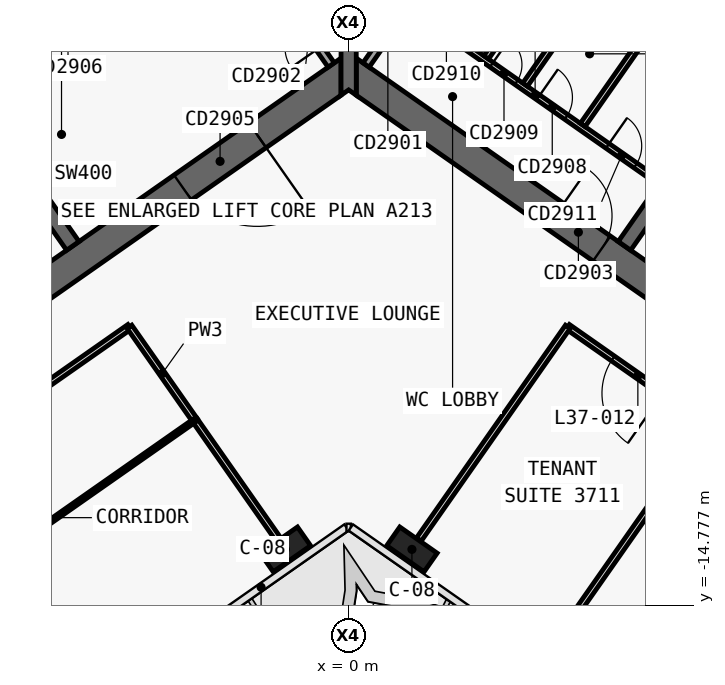
"""IFC4 building model, lengths in metres.
Left out: names, types, materials, properties, quantities, classifications, styles, units other than length and angle.
Written with IfcOpenShell. Run it as: python <this file> out.ifc"""

import sys

from ifc_helpers import new_model, si_unit, direction, frame, frame_2d, origin, origin_2d, place, context, subcontext, project, spatial, polyline, rectangle, outline, extrude, element, fill, save


model = new_model("IFC4")
c1 = context("Model", 3, precision=1e-05, world=origin(), true_north=direction((0.0, 1.0)))
c2 = subcontext(c1, "Body", "Model", "MODEL_VIEW")
j1 = project(units=[si_unit("LENGTHUNIT", "METRE"), si_unit("PLANEANGLEUNIT", "RADIAN")], contexts=[c1])
p1 = place(None, origin())
s1 = spatial("IfcSite", under=j1, at=p1, CompositionType="ELEMENT")
p2 = place(p1, origin())
s2 = spatial("IfcBuilding", under=s1, at=p2, CompositionType="ELEMENT")
p3 = place(p2, frame((0.0, 0.0, 163.2)))
s3 = spatial("IfcBuildingStorey", under=s2, at=p3, CompositionType="ELEMENT", Elevation=163.2)
p4 = place(p3, frame((0.029, 11.984, 0.0), z_axis=(0.0, 0.0, 1.0), x_axis=(-0.819151382952, -0.573577380837, 0.0)))
e1 = element("IfcWall", 1, at=p4, inside=s3, PredefinedType="SHEAR", context=c2, shape_type="SweptSolid", body=[
    extrude(outline(polyline([(33.898, 0.4), (0.56, 0.4), (-0.0, -0.4), (33.898, -0.4), (33.898, 0.4)])), origin(), (0.0, 0.0, 1.0), 3.9),
])
p5 = place(p3, frame((0.029, -0.712, 0.0), z_axis=(0.0, 0.0, 1.0), x_axis=(-0.819151758019, -0.573576845187, 0.0)))
e2 = element("IfcWall", 2, at=p5, inside=s3, PredefinedType="SHEAR", context=c2, shape_type="SweptSolid", body=[
    extrude(outline(polyline([(26.616, 0.4), (0.56, 0.4), (-0.0, -0.4), (26.616, -0.4), (26.616, 0.4)])), origin(), (0.0, 0.0, 1.0), 3.9),
])
p6 = place(p5, frame((2.966, 0.0, 0.0)))
e3 = element("IfcOpeningElement", 3, at=p6, cuts=e2, PredefinedType="OPENING", context=c2, shape_type="SweptSolid", body=[
    extrude(rectangle(XDim=2.4, YDim=2.1, at=frame_2d((1.2, 1.05))), frame((0.0, 0.41, 0.0), z_axis=(0.0, -1.0, 0.0), x_axis=(1.0, 0.0, 0.0)), (0.0, 0.0, 1.0), 0.82),
])
p7 = place(p5, frame((11.916, 0.0, 0.0)))
e4 = element("IfcOpeningElement", 4, at=p7, cuts=e2, PredefinedType="OPENING", context=c2, shape_type="SweptSolid", body=[
    extrude(rectangle(XDim=2.4, YDim=2.1, at=frame_2d((1.2, 1.05))), frame((0.0, 0.41, 0.0), z_axis=(0.0, -1.0, 0.0), x_axis=(1.0, 0.0, 0.0)), (0.0, 0.0, 1.0), 0.82),
])
p8 = place(p3, frame((-7.258, -5.326, 0.0), z_axis=(0.0, 0.0, 1.0), x_axis=(-0.573540709186, 0.819177059558, 0.0)))
e5 = element("IfcWall", 5, at=p8, inside=s3, PredefinedType="SHEAR", context=c2, shape_type="SweptSolid", body=[
    extrude(outline(polyline([(4.6, 0.2), (-0.0, 0.2), (-0.0, -0.2), (4.6, -0.2), (4.6, 0.2)])), origin(), (0.0, 0.0, 1.0), 3.9),
])
p9 = place(p3, frame((-2.638, 3.768, 0.0), z_axis=(0.0, 0.0, 1.0), x_axis=(-0.81915267502, -0.573575535572, 0.0)))
e6 = element("IfcWall", 6, at=p9, inside=s3, PredefinedType="SHEAR", context=c2, shape_type="SweptSolid", body=[
    extrude(outline(polyline([(26.2, 0.2), (0.0, 0.2), (0.0, -0.2), (26.2, -0.2), (26.2, 0.2)])), origin(), (0.0, 0.0, 1.0), 3.9),
])
p10 = place(p9, frame((1.169, 0.0, 0.0)))
e7 = element("IfcOpeningElement", 7, at=p10, cuts=e6, PredefinedType="OPENING", context=c2, shape_type="SweptSolid", body=[
    extrude(rectangle(XDim=1.1, YDim=2.1, at=frame_2d((0.55, 1.05))), frame((0.0, 0.21, 0.0), z_axis=(0.0, -1.0, 0.0), x_axis=(1.0, 0.0, 0.0)), (0.0, 0.0, 1.0), 0.42),
])
p11 = place(p9, frame((3.206, 0.0, 0.0)))
e8 = element("IfcOpeningElement", 8, at=p11, cuts=e6, PredefinedType="OPENING", context=c2, shape_type="SweptSolid", body=[
    extrude(rectangle(XDim=1.1, YDim=2.1, at=frame_2d((0.55, 1.05))), frame((0.0, 0.21, 0.0), z_axis=(0.0, -1.0, 0.0), x_axis=(1.0, 0.0, 0.0)), (0.0, 0.0, 1.0), 0.42),
])
p12 = place(p9, frame((5.244, 0.0, 0.0)))
e9 = element("IfcOpeningElement", 9, at=p12, cuts=e6, PredefinedType="OPENING", context=c2, shape_type="SweptSolid", body=[
    extrude(rectangle(XDim=1.1, YDim=2.1, at=frame_2d((0.55, 1.05))), frame((0.0, 0.21, 0.0), z_axis=(0.0, -1.0, 0.0), x_axis=(1.0, 0.0, 0.0)), (0.0, 0.0, 1.0), 0.42),
])
p13 = place(p9, frame((7.281, 0.0, 0.0)))
e10 = element("IfcOpeningElement", 10, at=p13, cuts=e6, PredefinedType="OPENING", context=c2, shape_type="SweptSolid", body=[
    extrude(rectangle(XDim=1.1, YDim=2.1, at=frame_2d((0.55, 1.05))), frame((0.0, 0.21, 0.0), z_axis=(0.0, -1.0, 0.0), x_axis=(1.0, 0.0, 0.0)), (0.0, 0.0, 1.0), 0.42),
])
p14 = place(p9, frame((9.688, 0.0, 0.0)))
e11 = element("IfcOpeningElement", 11, at=p14, cuts=e6, PredefinedType="OPENING", context=c2, shape_type="SweptSolid", body=[
    extrude(rectangle(XDim=1.1, YDim=2.1, at=frame_2d((0.55, 1.05))), frame((0.0, 0.21, 0.0), z_axis=(0.0, -1.0, 0.0), x_axis=(1.0, 0.0, 0.0)), (0.0, 0.0, 1.0), 0.42),
])
p15 = place(p9, frame((11.863, 0.0, 0.0)))
e12 = element("IfcOpeningElement", 12, at=p15, cuts=e6, PredefinedType="OPENING", context=c2, shape_type="SweptSolid", body=[
    extrude(rectangle(XDim=1.1, YDim=2.1, at=frame_2d((0.55, 1.05))), frame((0.0, 0.21, 0.0), z_axis=(0.0, -1.0, 0.0), x_axis=(1.0, 0.0, 0.0)), (0.0, 0.0, 1.0), 0.42),
])
p16 = place(p9, frame((14.038, 0.0, 0.0)))
e13 = element("IfcOpeningElement", 13, at=p16, cuts=e6, PredefinedType="OPENING", context=c2, shape_type="SweptSolid", body=[
    extrude(rectangle(XDim=1.1, YDim=2.1, at=frame_2d((0.55, 1.05))), frame((0.0, 0.21, 0.0), z_axis=(0.0, -1.0, 0.0), x_axis=(1.0, 0.0, 0.0)), (0.0, 0.0, 1.0), 0.42),
])
p17 = place(p9, frame((16.212, 0.0, 0.0)))
e14 = element("IfcOpeningElement", 14, at=p17, cuts=e6, PredefinedType="OPENING", context=c2, shape_type="SweptSolid", body=[
    extrude(rectangle(XDim=1.1, YDim=2.1, at=frame_2d((0.55, 1.05))), frame((0.0, 0.21, 0.0), z_axis=(0.0, -1.0, 0.0), x_axis=(1.0, 0.0, 0.0)), (0.0, 0.0, 1.0), 0.42),
])
p18 = place(p3, frame((-0.029, 11.984, 0.0), z_axis=(0.0, 0.0, 1.0), x_axis=(0.819151382952, -0.573577380837, 0.0)))
e15 = element("IfcWall", 15, at=p18, inside=s3, PredefinedType="SHEAR", context=c2, shape_type="SweptSolid", body=[
    extrude(outline(polyline([(33.898, 0.4), (-0.0, 0.4), (0.56, -0.4), (33.898, -0.4), (33.898, 0.4)])), origin(), (0.0, 0.0, 1.0), 3.9),
])
p19 = place(p3, frame((-0.029, -0.712, 0.0), z_axis=(0.0, 0.0, 1.0), x_axis=(0.819151758019, -0.573576845187, 0.0)))
e16 = element("IfcWall", 16, at=p19, inside=s3, PredefinedType="SHEAR", context=c2, shape_type="SweptSolid", body=[
    extrude(outline(polyline([(26.616, 0.4), (-0.0, 0.4), (0.56, -0.4), (26.616, -0.4), (26.616, 0.4)])), origin(), (0.0, 0.0, 1.0), 3.9),
])
p20 = place(p19, frame((6.666, 0.0, 0.0)))
e17 = element("IfcOpeningElement", 17, at=p20, cuts=e16, PredefinedType="OPENING", context=c2, shape_type="SweptSolid", body=[
    extrude(rectangle(XDim=1.5, YDim=2.1, at=frame_2d((0.75, 1.05))), frame((0.0, 0.41, 0.0), z_axis=(0.0, -1.0, 0.0), x_axis=(1.0, 0.0, 0.0)), (0.0, 0.0, 1.0), 0.82),
])
p21 = place(p19, frame((12.366, 0.0, 0.0)))
e18 = element("IfcOpeningElement", 18, at=p21, cuts=e16, PredefinedType="OPENING", context=c2, shape_type="SweptSolid", body=[
    extrude(rectangle(XDim=1.5, YDim=2.1, at=frame_2d((0.75, 1.05))), frame((0.0, 0.41, 0.0), z_axis=(0.0, -1.0, 0.0), x_axis=(1.0, 0.0, 0.0)), (0.0, 0.0, 1.0), 0.82),
])
p22 = place(p3, frame((7.258, -5.326, 0.0), z_axis=(0.0, 0.0, 1.0), x_axis=(0.573540709186, 0.819177059558, 0.0)))
e19 = element("IfcWall", 19, at=p22, inside=s3, PredefinedType="SHEAR", context=c2, shape_type="SweptSolid", body=[
    extrude(outline(polyline([(-0.0, 0.2), (-0.0, -0.2), (4.6, -0.2), (4.6, 0.2), (-0.0, 0.2)])), origin(), (0.0, 0.0, 1.0), 3.9),
])
p23 = place(p3, frame((2.638, 3.768, 0.0), z_axis=(0.0, 0.0, 1.0), x_axis=(0.81915267502, -0.573575535572, 0.0)))
e20 = element("IfcWall", 20, at=p23, inside=s3, PredefinedType="SHEAR", context=c2, shape_type="SweptSolid", body=[
    extrude(outline(polyline([(0.0, 0.2), (0.0, -0.2), (26.2, -0.2), (26.2, 0.2), (0.0, 0.2)])), origin(), (0.0, 0.0, 1.0), 3.9),
])
p24 = place(p23, frame((9.637, 0.0, 0.0)))
e21 = element("IfcOpeningElement", 21, at=p24, cuts=e20, PredefinedType="OPENING", context=c2, shape_type="SweptSolid", body=[
    extrude(rectangle(XDim=1.2, YDim=2.1, at=frame_2d((0.6, 1.05))), frame((0.0, 0.21, 0.0), z_axis=(0.0, -1.0, 0.0), x_axis=(1.0, 0.0, 0.0)), (0.0, 0.0, 1.0), 0.42),
])
p25 = place(p23, frame((11.812, 0.0, 0.0)))
e22 = element("IfcOpeningElement", 22, at=p25, cuts=e20, PredefinedType="OPENING", context=c2, shape_type="SweptSolid", body=[
    extrude(rectangle(XDim=1.2, YDim=2.1, at=frame_2d((0.6, 1.05))), frame((0.0, 0.21, 0.0), z_axis=(0.0, -1.0, 0.0), x_axis=(1.0, 0.0, 0.0)), (0.0, 0.0, 1.0), 0.42),
])
p26 = place(p23, frame((13.988, 0.0, 0.0)))
e23 = element("IfcOpeningElement", 23, at=p26, cuts=e20, PredefinedType="OPENING", context=c2, shape_type="SweptSolid", body=[
    extrude(rectangle(XDim=1.2, YDim=2.1, at=frame_2d((0.6, 1.05))), frame((0.0, 0.21, 0.0), z_axis=(0.0, -1.0, 0.0), x_axis=(1.0, 0.0, 0.0)), (0.0, 0.0, 1.0), 0.42),
])
p27 = place(p23, frame((16.262, 0.0, 0.0)))
e24 = element("IfcOpeningElement", 24, at=p27, cuts=e20, PredefinedType="OPENING", context=c2, shape_type="SweptSolid", body=[
    extrude(rectangle(XDim=1.0, YDim=2.1, at=frame_2d((0.5, 1.05))), frame((0.0, 0.21, 0.0), z_axis=(0.0, -1.0, 0.0), x_axis=(1.0, 0.0, 0.0)), (0.0, 0.0, 1.0), 0.42),
])
p28 = place(p3, frame((0.0, -1.361, 0.0), z_axis=(0.0, 0.0, 1.0), x_axis=(0.0, 1.0, 0.0)))
e25 = element("IfcWall", 25, at=p28, inside=s3, PredefinedType="SHEAR", context=c2, shape_type="SweptSolid", body=[
    extrude(outline(polyline([(0.0, -0.2), (0.14, -0.2), (1.075, -0.2), (12.696, -0.2), (13.813, -0.2), (13.893, -0.2), (13.933, -0.172), (13.813, 0.0), (13.933, 0.172), (13.893, 0.2), (13.813, 0.2), (12.696, 0.2), (1.075, 0.2), (0.14, 0.2), (0.0, 0.2), (0.14, 0.0), (0.0, -0.2)])), origin(), (0.0, 0.0, 1.0), 3.9),
])
for number, where, z_axis, x_axis in (
    (26, (-1.665, -13.313, 0.0), (0.0, 0.0, 1.0), (-0.819, -0.574, 0.0)),
    (27, (1.665, -13.313, 0.0), (0.0, 0.0, 1.0), (0.819, -0.574, 0.0)),
):
    element("IfcColumn", number, at=place(p3, frame(where, z_axis=z_axis, x_axis=x_axis)), inside=s3, PredefinedType="COLUMN", context=c2, shape_type="SweptSolid", body=[
        extrude(rectangle(XDim=1.2, YDim=0.6, at=origin_2d()), origin(), (0.0, 0.0, 1.0), 3.9),
    ])
p29 = place(p3, frame((1.63, 0.934, 0.0), z_axis=(0.0, 0.0, 1.0), x_axis=(0.819165963305, -0.573556557423, 0.0)))
e28 = element("IfcWall", 28, at=p29, inside=s3, PredefinedType="PARTITIONING", context=c2, shape_type="SweptSolid", body=[
    extrude(rectangle(XDim=8.0, YDim=0.15, at=frame_2d((4.0, 0.0))), origin(), (0.0, 0.0, 1.0), 3.62),
])
p30 = place(p29, frame((0.7, 0.0, 0.0)))
e29 = element("IfcOpeningElement", 29, at=p30, cuts=e28, PredefinedType="OPENING", context=c2, shape_type="SweptSolid", body=[
    extrude(rectangle(XDim=0.9, YDim=2.1, at=frame_2d((0.45, 1.05))), frame((0.0, 0.085, 0.0), z_axis=(0.0, -1.0, 0.0), x_axis=(1.0, 0.0, 0.0)), (0.0, 0.0, 1.0), 0.17),
])
p31 = place(p29, frame((2.6, 0.0, 0.0)))
e30 = element("IfcOpeningElement", 30, at=p31, cuts=e28, PredefinedType="OPENING", context=c2, shape_type="SweptSolid", body=[
    extrude(rectangle(XDim=0.8, YDim=2.1, at=frame_2d((0.4, 1.05))), frame((0.0, 0.085, 0.0), z_axis=(0.0, -1.0, 0.0), x_axis=(1.0, 0.0, 0.0)), (0.0, 0.0, 1.0), 0.17),
])
p32 = place(p29, frame((4.1, 0.0, 0.0)))
e31 = element("IfcOpeningElement", 31, at=p32, cuts=e28, PredefinedType="OPENING", context=c2, shape_type="SweptSolid", body=[
    extrude(rectangle(XDim=0.9, YDim=2.1, at=frame_2d((0.45, 1.05))), frame((0.0, 0.085, 0.0), z_axis=(0.0, -1.0, 0.0), x_axis=(1.0, 0.0, 0.0)), (0.0, 0.0, 1.0), 0.17),
])
p33 = place(p29, frame((6.325, 0.0, 0.0)))
e32 = element("IfcOpeningElement", 32, at=p33, cuts=e28, PredefinedType="OPENING", context=c2, shape_type="SweptSolid", body=[
    extrude(rectangle(XDim=0.9, YDim=2.1, at=frame_2d((0.45, 1.05))), frame((0.0, 0.085, 0.0), z_axis=(0.0, -1.0, 0.0), x_axis=(1.0, 0.0, 0.0)), (0.0, 0.0, 1.0), 0.17),
])
for number, where, z_axis, x_axis in (
    (33, (3.619, -0.367, 0.0), (0.0, 0.0, 1.0), (0.574, 0.819, 0.0)),
    (34, (4.643, -1.084, 0.0), (0.0, 0.0, 1.0), (0.574, 0.819, 0.0)),
    (35, (6.158, -2.145, 0.0), (0.0, 0.0, 1.0), (0.574, 0.819, 0.0)),
):
    element("IfcWall", number, at=place(p3, frame(where, z_axis=z_axis, x_axis=x_axis)), inside=s3, PredefinedType="PARTITIONING", context=c2, shape_type="SweptSolid", body=[
        extrude(rectangle(XDim=2.625, YDim=0.15, at=frame_2d((1.312, 0.0))), origin(), (0.0, 0.0, 1.0), 3.62),
    ])
p34 = place(p3, frame((-0.459, -0.565, 0.0), z_axis=(0.0, 0.0, 1.0), x_axis=(-0.573576324356, 0.819152122709, 0.0)))
e36 = element("IfcWall", 36, at=p34, inside=s3, PredefinedType="SOLIDWALL", context=c2, shape_type="SweptSolid", body=[
    extrude(rectangle(XDim=4.6, YDim=0.2, at=frame_2d((2.3, 0.0))), origin(), (0.0, 0.0, 1.0), 3.62),
])
p35 = place(p34, frame((0.55, 0.0, 0.0)))
e37 = element("IfcOpeningElement", 37, at=p35, cuts=e36, PredefinedType="OPENING", context=c2, shape_type="SweptSolid", body=[
    extrude(rectangle(XDim=0.9, YDim=2.1, at=frame_2d((0.45, 1.05))), frame((0.0, 0.11, 0.0), z_axis=(0.0, -1.0, 0.0), x_axis=(1.0, 0.0, 0.0)), (0.0, 0.0, 1.0), 0.22),
])
p36 = place(p3, frame((0.459, -0.565, 0.0), z_axis=(0.0, 0.0, 1.0), x_axis=(0.573576324356, 0.819152122709, 0.0)))
e38 = element("IfcWall", 38, at=p36, inside=s3, PredefinedType="SOLIDWALL", context=c2, shape_type="SweptSolid", body=[
    extrude(rectangle(XDim=4.6, YDim=0.2, at=frame_2d((2.3, 0.0))), origin(), (0.0, 0.0, 1.0), 3.62),
])
p37 = place(p36, frame((0.55, 0.0, 0.0)))
e39 = element("IfcOpeningElement", 39, at=p37, cuts=e38, PredefinedType="OPENING", context=c2, shape_type="SweptSolid", body=[
    extrude(rectangle(XDim=0.9, YDim=2.1, at=frame_2d((0.45, 1.05))), frame((0.0, 0.11, 0.0), z_axis=(0.0, -1.0, 0.0), x_axis=(1.0, 0.0, 0.0)), (0.0, 0.0, 1.0), 0.22),
])
p38 = place(p3, frame((9.454, -10.038, 0.0), z_axis=(0.0, 0.0, 1.0), x_axis=(-0.819142740634, 0.573589723117, 0.0)))
e40 = element("IfcWall", 40, at=p38, inside=s3, PredefinedType="PARTITIONING", context=c2, shape_type="SweptSolid", body=[
    extrude(rectangle(XDim=4.502, YDim=0.15, at=frame_2d((2.251, 0.0))), origin(), (0.0, 0.0, 1.0), 3.0),
])
p39 = place(p38, frame((1.451, 0.0, 0.0)))
e41 = element("IfcOpeningElement", 41, at=p39, cuts=e40, PredefinedType="OPENING", context=c2, shape_type="SweptSolid", body=[
    extrude(rectangle(XDim=1.6, YDim=2.1, at=frame_2d((0.8, 1.05))), frame((0.0, 0.085, 0.0), z_axis=(0.0, -1.0, 0.0), x_axis=(1.0, 0.0, 0.0)), (0.0, 0.0, 1.0), 0.17),
])
p40 = place(p3, frame((-5.766, -7.456, 0.0), z_axis=(0.0, 0.0, 1.0), x_axis=(-0.81915546166, -0.573571555809, 0.0)))
e42 = element("IfcWall", 42, at=p40, inside=s3, PredefinedType="PARTITIONING", context=c2, shape_type="SweptSolid", body=[
    extrude(rectangle(XDim=12.002, YDim=0.15, at=frame_2d((6.001, 0.0))), origin(), (0.0, 0.0, 1.0), 3.0),
])
p41 = place(p40, frame((5.201, 0.0, 0.0)))
e43 = element("IfcOpeningElement", 43, at=p41, cuts=e42, PredefinedType="OPENING", context=c2, shape_type="SweptSolid", body=[
    extrude(rectangle(XDim=1.6, YDim=2.1, at=frame_2d((0.8, 1.05))), frame((0.0, 0.085, 0.0), z_axis=(0.0, -1.0, 0.0), x_axis=(1.0, 0.0, 0.0)), (0.0, 0.0, 1.0), 0.17),
])
p42 = place(p3, frame((9.452, -10.037, 0.0), z_axis=(0.0, 0.0, 1.0), x_axis=(-0.573575945067, -0.81915238829, 0.0)))
e44 = element("IfcWall", 44, at=p42, inside=s3, PredefinedType="PARTITIONING", context=c2, shape_type="SweptSolid", body=[
    extrude(rectangle(XDim=7.5, YDim=0.15, at=frame_2d((3.75, 0.0))), origin(), (0.0, 0.0, 1.0), 2.9),
])
p43 = place(p3, frame((1.849, -13.051, 0.0), z_axis=(0.0, 0.0, 1.0), x_axis=(0.573577493031, 0.819151304393, 0.0)))
e45 = element("IfcWall", 45, at=p43, inside=s3, PredefinedType="PARTITIONING", context=c2, shape_type="SweptSolid", body=[
    extrude(rectangle(XDim=6.83, YDim=0.15, at=frame_2d((3.415, 0.0))), origin(), (0.0, 0.0, 1.0), 3.0),
])
p44 = place(p3, frame((11.91, -11.758, 0.0), z_axis=(0.0, 0.0, 1.0), x_axis=(-0.573560650686, -0.819163097304, 0.0)))
e46 = element("IfcWall", 46, at=p44, inside=s3, PredefinedType="PARTITIONING", context=c2, shape_type="SweptSolid", body=[
    extrude(rectangle(XDim=7.5, YDim=0.15, at=frame_2d((3.75, 0.0))), origin(), (0.0, 0.0, 1.0), 2.9),
])
p45 = place(p3, frame((-1.849, -13.051, 0.0), z_axis=(0.0, 0.0, 1.0), x_axis=(-0.573586379587, 0.81914508187, 0.0)))
e47 = element("IfcWall", 47, at=p45, inside=s3, PredefinedType="PARTITIONING", context=c2, shape_type="SweptSolid", body=[
    extrude(rectangle(XDim=3.831, YDim=0.15, at=frame_2d((1.916, 0.0))), origin(), (0.0, 0.0, 1.0), 3.0),
])
p46 = place(p3, frame((-4.044, -9.915, 0.0), z_axis=(0.0, 0.0, 1.0), x_axis=(-0.573609604409, 0.819128818764, 0.0)))
e48 = element("IfcWall", 48, at=p46, inside=s3, PredefinedType="PARTITIONING", context=c2, shape_type="SweptSolid", body=[
    extrude(rectangle(XDim=3.004, YDim=0.15, at=frame_2d((1.502, 0.0))), origin(), (0.0, 0.0, 1.0), 3.0),
])
p47 = place(p3, frame((-4.045, -9.914, 0.0), z_axis=(0.0, 0.0, 1.0), x_axis=(-0.819146845232, -0.573583861302, 0.0)))
e49 = element("IfcWall", 49, at=p47, inside=s3, PredefinedType="PARTITIONING", context=c2, shape_type="SweptSolid", body=[
    extrude(rectangle(XDim=12.0, YDim=0.1, at=frame_2d((6.0, 0.0))), origin(), (0.0, 0.0, 1.0), 3.0),
])
p48 = place(p47, frame((5.55, 0.0, 0.0)))
e50 = element("IfcOpeningElement", 50, at=p48, cuts=e49, PredefinedType="OPENING", context=c2, shape_type="SweptSolid", body=[
    extrude(rectangle(XDim=0.9, YDim=2.1, at=frame_2d((0.45, 1.05))), frame((0.0, 0.06, 0.0), z_axis=(0.0, -1.0, 0.0), x_axis=(1.0, 0.0, 0.0)), (0.0, 0.0, 1.0), 0.12),
])
p49 = place(p6, origin())
e51 = element("IfcDoor", 51, at=p49, inside=s3, OperationType="DOUBLE_DOOR_SINGLE_SWING", PredefinedType="DOOR", context=c2, shape_type="SweptSolid", body=[
    extrude(rectangle(XDim=2.4, YDim=2.1, at=frame_2d((1.2, 1.05))), frame((0.0, 0.025, 0.0), z_axis=(0.0, -1.0, 0.0), x_axis=(1.0, 0.0, 0.0)), (0.0, 0.0, 1.0), 0.05),
])
fill(e3, e51)
p50 = place(p31, origin())
e52 = element("IfcDoor", 52, at=p50, inside=s3, OperationType="SINGLE_SWING_RIGHT", PredefinedType="DOOR", context=c2, shape_type="SweptSolid", body=[
    extrude(rectangle(XDim=0.8, YDim=2.1, at=frame_2d((0.4, 1.05))), frame((0.0, 0.025, 0.0), z_axis=(0.0, -1.0, 0.0), x_axis=(1.0, 0.0, 0.0)), (0.0, 0.0, 1.0), 0.05),
])
fill(e30, e52)
p51 = place(p32, origin())
e53 = element("IfcDoor", 53, at=p51, inside=s3, OperationType="SINGLE_SWING_RIGHT", PredefinedType="DOOR", context=c2, shape_type="SweptSolid", body=[
    extrude(rectangle(XDim=0.9, YDim=2.1, at=frame_2d((0.45, 1.05))), frame((0.0, 0.025, 0.0), z_axis=(0.0, -1.0, 0.0), x_axis=(1.0, 0.0, 0.0)), (0.0, 0.0, 1.0), 0.05),
])
fill(e31, e53)
p52 = place(p33, origin())
e54 = element("IfcDoor", 54, at=p52, inside=s3, OperationType="SINGLE_SWING_RIGHT", PredefinedType="DOOR", context=c2, shape_type="SweptSolid", body=[
    extrude(rectangle(XDim=0.9, YDim=2.1, at=frame_2d((0.45, 1.05))), frame((0.0, 0.025, 0.0), z_axis=(0.0, -1.0, 0.0), x_axis=(1.0, 0.0, 0.0)), (0.0, 0.0, 1.0), 0.05),
])
fill(e32, e54)
p53 = place(p20, origin())
e55 = element("IfcDoor", 55, at=p53, inside=s3, OperationType="SINGLE_SWING_RIGHT", PredefinedType="DOOR", context=c2, shape_type="SweptSolid", body=[
    extrude(rectangle(XDim=1.5, YDim=2.1, at=frame_2d((0.75, 1.05))), frame((0.0, 0.025, 0.0), z_axis=(0.0, -1.0, 0.0), x_axis=(1.0, 0.0, 0.0)), (0.0, 0.0, 1.0), 0.05),
])
fill(e17, e55)
p54 = place(p39, origin())
e56 = element("IfcDoor", 56, at=p54, inside=s3, OperationType="DOUBLE_DOOR_SINGLE_SWING", PredefinedType="DOOR", context=c2, shape_type="SweptSolid", body=[
    extrude(rectangle(XDim=1.6, YDim=2.1, at=frame_2d((0.8, 1.05))), frame((0.0, 0.025, 0.0), z_axis=(0.0, -1.0, 0.0), x_axis=(1.0, 0.0, 0.0)), (0.0, 0.0, 1.0), 0.05),
])
fill(e41, e56)
save(model, sys.argv[1])
